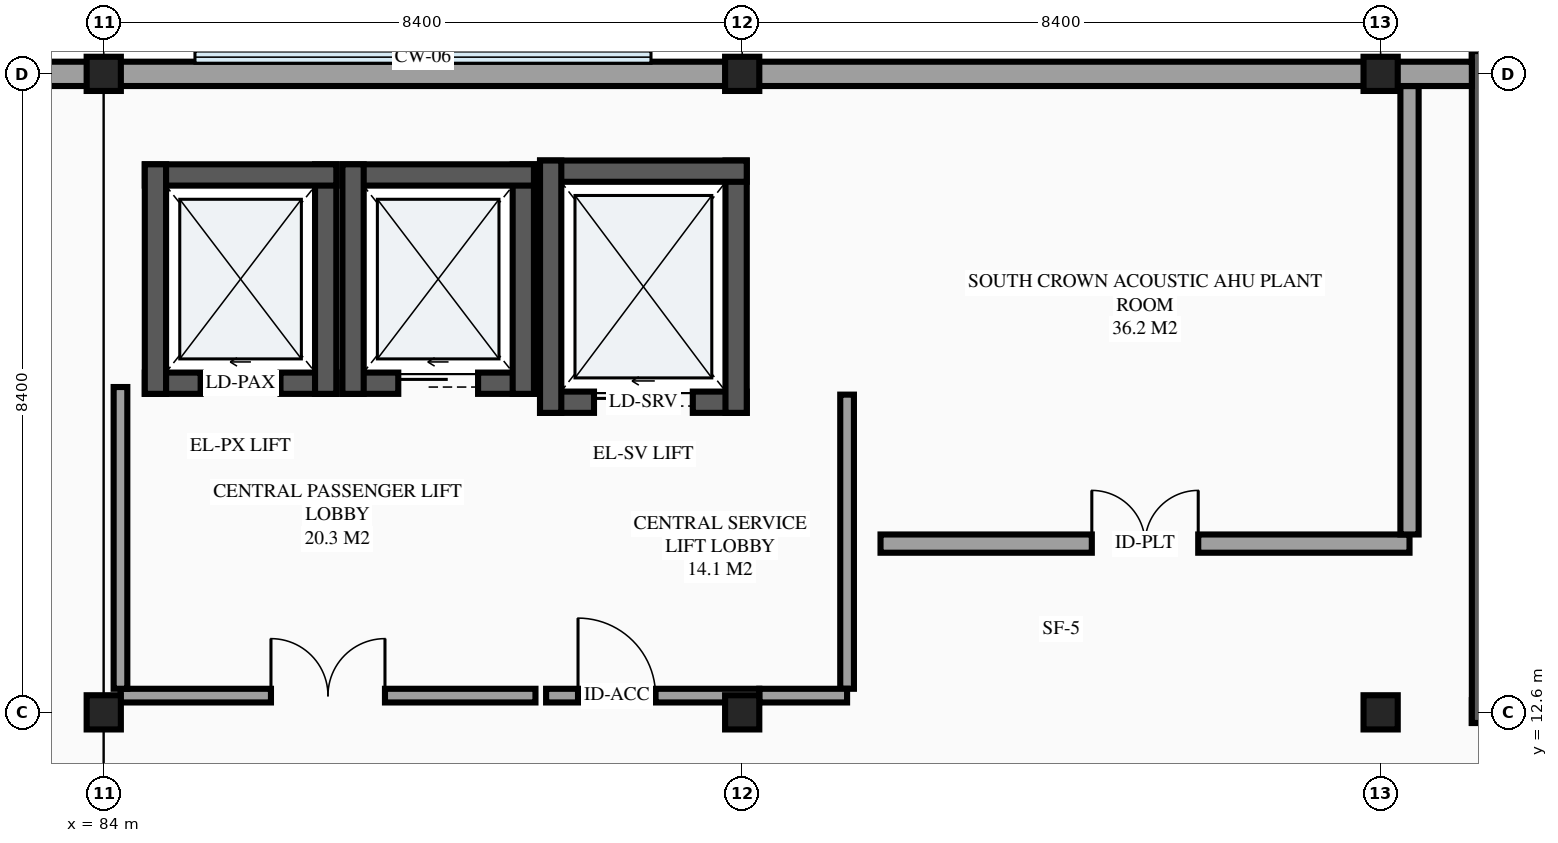
"""IFC4 building model, lengths in metres.
Left out: names, types, materials, properties, quantities, classifications, styles, units other than length and angle.
Written with IfcOpenShell. Run it as: python <this file> out.ifc"""

import sys

from ifc_helpers import new_model, si_unit, direction, frame, frame_2d, origin, origin_2d, place, context, subcontext, project, spatial, rectangle, extrude, element, fill, save


model = new_model("IFC4")
c1 = context("Model", 3, precision=1e-05, world=origin(), true_north=direction((0.0, 1.0)))
c2 = subcontext(c1, "Body", "Model", "MODEL_VIEW")
j1 = project(units=[si_unit("LENGTHUNIT", "METRE"), si_unit("PLANEANGLEUNIT", "RADIAN")], contexts=[c1])
p1 = place(None, origin())
s1 = spatial("IfcSite", under=j1, at=p1, CompositionType="ELEMENT")
p2 = place(p1, origin())
s2 = spatial("IfcBuilding", under=s1, at=p2, CompositionType="ELEMENT")
p3 = place(p2, frame((0.0, 0.0, 43.5)))
s3 = spatial("IfcBuildingStorey", under=s2, at=p3, CompositionType="ELEMENT", Elevation=43.5)
for number, where, z_axis, x_axis in (
    (1, (84.0, 12.6, 0.0), (0.0, 0.0, 1.0), (1.0, 0.0, 0.0)),
    (2, (84.0, 21.0, 0.0), (0.0, 0.0, 1.0), (1.0, 0.0, 0.0)),
    (3, (92.4, 12.6, 0.0), (0.0, 0.0, 1.0), (1.0, 0.0, 0.0)),
    (4, (92.4, 21.0, 0.0), (0.0, 0.0, 1.0), (1.0, 0.0, 0.0)),
    (5, (100.8, 12.6, 0.0), (0.0, 0.0, 1.0), (1.0, 0.0, 0.0)),
    (6, (100.8, 21.0, 0.0), (0.0, 0.0, 1.0), (1.0, 0.0, 0.0)),
):
    element("IfcColumn", number, at=place(p3, frame(where, z_axis=z_axis, x_axis=x_axis)), inside=s3, PredefinedType="COLUMN", context=c2, shape_type="SweptSolid", body=[
        extrude(rectangle(XDim=0.45, YDim=0.45, at=origin_2d()), origin(), (0.0, 0.0, 1.0), 3.6),
    ])
p4 = place(p3, frame((100.8, 21.0, 0.0), z_axis=(0.0, 0.0, 1.0), x_axis=(-1.0, 0.0, 0.0)))
e7 = element("IfcWall", 7, at=p4, inside=s3, PredefinedType="STANDARD", context=c2, shape_type="SweptSolid", body=[
    extrude(rectangle(XDim=8.4, YDim=0.32, at=frame_2d((4.2, 0.0))), origin(), (0.0, 0.0, 1.0), 2.51),
])
p5 = place(p3, frame((84.54, 16.93, 0.0), z_axis=(0.0, 0.0, 1.0), x_axis=(1.0, 0.0, 0.0)))
e8 = element("IfcWall", 8, at=p5, inside=s3, PredefinedType="SHEAR", context=c2, shape_type="SweptSolid", body=[
    extrude(rectangle(XDim=2.52, YDim=0.28, at=frame_2d((1.26, 0.0))), origin(), (0.0, 0.0, 1.0), 3.6),
])
p6 = place(p5, frame((0.735, 0.0, 0.0)))
e9 = element("IfcOpeningElement", 9, at=p6, cuts=e8, PredefinedType="OPENING", context=c2, shape_type="SweptSolid", body=[
    extrude(rectangle(XDim=1.05, YDim=2.2, at=frame_2d((0.525, 1.1))), frame((0.0, 0.15, 0.0), z_axis=(0.0, -1.0, 0.0), x_axis=(1.0, 0.0, 0.0)), (0.0, 0.0, 1.0), 0.3),
])
p7 = place(p3, frame((86.92, 16.79, 0.0), z_axis=(0.0, 0.0, 1.0), x_axis=(0.0, 1.0, 0.0)))
e10 = element("IfcWall", 10, at=p7, inside=s3, PredefinedType="SHEAR", context=c2, shape_type="SweptSolid", body=[
    extrude(rectangle(XDim=3.02, YDim=0.28, at=frame_2d((1.51, 0.0))), origin(), (0.0, 0.0, 1.0), 3.6),
])
p8 = place(p3, frame((87.06, 19.67, 0.0), z_axis=(0.0, 0.0, 1.0), x_axis=(-1.0, 0.0, 0.0)))
e11 = element("IfcWall", 11, at=p8, inside=s3, PredefinedType="SHEAR", context=c2, shape_type="SweptSolid", body=[
    extrude(rectangle(XDim=2.52, YDim=0.28, at=frame_2d((1.26, 0.0))), origin(), (0.0, 0.0, 1.0), 3.6),
])
p9 = place(p3, frame((84.68, 19.81, 0.0), z_axis=(0.0, 0.0, 1.0), x_axis=(0.0, -1.0, 0.0)))
e12 = element("IfcWall", 12, at=p9, inside=s3, PredefinedType="SHEAR", context=c2, shape_type="SweptSolid", body=[
    extrude(rectangle(XDim=3.02, YDim=0.28, at=frame_2d((1.51, 0.0))), origin(), (0.0, 0.0, 1.0), 3.6),
])
p10 = place(p3, frame((87.14, 16.93, 0.0), z_axis=(0.0, 0.0, 1.0), x_axis=(1.0, 0.0, 0.0)))
e13 = element("IfcWall", 13, at=p10, inside=s3, PredefinedType="SHEAR", context=c2, shape_type="SweptSolid", body=[
    extrude(rectangle(XDim=2.52, YDim=0.28, at=frame_2d((1.26, 0.0))), origin(), (0.0, 0.0, 1.0), 3.6),
])
p11 = place(p10, frame((0.735, 0.0, 0.0)))
e14 = element("IfcOpeningElement", 14, at=p11, cuts=e13, PredefinedType="OPENING", context=c2, shape_type="SweptSolid", body=[
    extrude(rectangle(XDim=1.05, YDim=2.2, at=frame_2d((0.525, 1.1))), frame((0.0, 0.15, 0.0), z_axis=(0.0, -1.0, 0.0), x_axis=(1.0, 0.0, 0.0)), (0.0, 0.0, 1.0), 0.3),
])
p12 = place(p3, frame((89.52, 16.79, 0.0), z_axis=(0.0, 0.0, 1.0), x_axis=(0.0, 1.0, 0.0)))
e15 = element("IfcWall", 15, at=p12, inside=s3, PredefinedType="SHEAR", context=c2, shape_type="SweptSolid", body=[
    extrude(rectangle(XDim=3.02, YDim=0.28, at=frame_2d((1.51, 0.0))), origin(), (0.0, 0.0, 1.0), 3.6),
])
p13 = place(p3, frame((89.66, 19.67, 0.0), z_axis=(0.0, 0.0, 1.0), x_axis=(-1.0, 0.0, 0.0)))
e16 = element("IfcWall", 16, at=p13, inside=s3, PredefinedType="SHEAR", context=c2, shape_type="SweptSolid", body=[
    extrude(rectangle(XDim=2.52, YDim=0.28, at=frame_2d((1.26, 0.0))), origin(), (0.0, 0.0, 1.0), 3.6),
])
p14 = place(p3, frame((87.28, 19.81, 0.0), z_axis=(0.0, 0.0, 1.0), x_axis=(0.0, -1.0, 0.0)))
e17 = element("IfcWall", 17, at=p14, inside=s3, PredefinedType="SHEAR", context=c2, shape_type="SweptSolid", body=[
    extrude(rectangle(XDim=3.02, YDim=0.28, at=frame_2d((1.51, 0.0))), origin(), (0.0, 0.0, 1.0), 3.6),
])
p15 = place(p3, frame((89.74, 16.68, 0.0), z_axis=(0.0, 0.0, 1.0), x_axis=(1.0, 0.0, 0.0)))
e18 = element("IfcWall", 18, at=p15, inside=s3, PredefinedType="SHEAR", context=c2, shape_type="SweptSolid", body=[
    extrude(rectangle(XDim=2.72, YDim=0.28, at=frame_2d((1.36, 0.0))), origin(), (0.0, 0.0, 1.0), 3.6),
])
p16 = place(p15, frame((0.71, 0.0, 0.0)))
e19 = element("IfcOpeningElement", 19, at=p16, cuts=e18, PredefinedType="OPENING", context=c2, shape_type="SweptSolid", body=[
    extrude(rectangle(XDim=1.3, YDim=2.25, at=frame_2d((0.65, 1.125))), frame((0.0, 0.15, 0.0), z_axis=(0.0, -1.0, 0.0), x_axis=(1.0, 0.0, 0.0)), (0.0, 0.0, 1.0), 0.3),
])
p17 = place(p3, frame((92.32, 16.54, 0.0), z_axis=(0.0, 0.0, 1.0), x_axis=(0.0, 1.0, 0.0)))
e20 = element("IfcWall", 20, at=p17, inside=s3, PredefinedType="SHEAR", context=c2, shape_type="SweptSolid", body=[
    extrude(rectangle(XDim=3.32, YDim=0.28, at=frame_2d((1.66, 0.0))), origin(), (0.0, 0.0, 1.0), 3.6),
])
p18 = place(p3, frame((92.46, 19.72, 0.0), z_axis=(0.0, 0.0, 1.0), x_axis=(-1.0, 0.0, 0.0)))
e21 = element("IfcWall", 21, at=p18, inside=s3, PredefinedType="SHEAR", context=c2, shape_type="SweptSolid", body=[
    extrude(rectangle(XDim=2.72, YDim=0.28, at=frame_2d((1.36, 0.0))), origin(), (0.0, 0.0, 1.0), 3.6),
])
p19 = place(p3, frame((89.88, 19.86, 0.0), z_axis=(0.0, 0.0, 1.0), x_axis=(0.0, -1.0, 0.0)))
e22 = element("IfcWall", 22, at=p19, inside=s3, PredefinedType="SHEAR", context=c2, shape_type="SweptSolid", body=[
    extrude(rectangle(XDim=3.32, YDim=0.28, at=frame_2d((1.66, 0.0))), origin(), (0.0, 0.0, 1.0), 3.6),
])
p20 = place(p3, frame((102.0, 12.61, 0.0), z_axis=(0.0, 0.0, 1.0), x_axis=(1.0, 0.0, 0.0)))
e23 = element("IfcWall", 23, at=p20, inside=s3, PredefinedType="SHEAR", context=c2, shape_type="SweptSolid", body=[
    extrude(rectangle(XDim=5.2, YDim=0.3, at=frame_2d((2.6, 0.0))), origin(), (0.0, 0.0, 1.0), 3.6),
])
p21 = place(p20, frame((2.025, 0.0, 0.0)))
e24 = element("IfcOpeningElement", 24, at=p21, cuts=e23, PredefinedType="OPENING", context=c2, shape_type="SweptSolid", body=[
    extrude(rectangle(XDim=1.15, YDim=2.15, at=frame_2d((0.575, 1.075))), frame((0.0, 0.16, 0.0), z_axis=(0.0, -1.0, 0.0), x_axis=(1.0, 0.0, 0.0)), (0.0, 0.0, 1.0), 0.32),
])
p22 = place(p3, frame((107.2, 21.15, 0.0), z_axis=(0.0, 0.0, 1.0), x_axis=(-1.0, 0.0, 0.0)))
e25 = element("IfcWall", 25, at=p22, inside=s3, PredefinedType="SHEAR", context=c2, shape_type="SweptSolid", body=[
    extrude(rectangle(XDim=5.2, YDim=0.3, at=frame_2d((2.6, 0.0))), origin(), (0.0, 0.0, 1.0), 3.6),
])
p23 = place(p3, frame((102.15, 21.3, 0.0), z_axis=(0.0, 0.0, 1.0), x_axis=(0.0, -1.0, 0.0)))
e26 = element("IfcWall", 26, at=p23, inside=s3, PredefinedType="SHEAR", context=c2, shape_type="SweptSolid", body=[
    extrude(rectangle(XDim=8.84, YDim=0.3, at=frame_2d((4.42, 0.0))), origin(), (0.0, 0.0, 1.0), 3.6),
])
p24 = place(p3, frame((84.22, 12.82, 0.0), z_axis=(0.0, 0.0, 1.0), x_axis=(1.0, 0.0, 0.0)))
e27 = element("IfcWall", 27, at=p24, inside=s3, PredefinedType="PARTITIONING", context=c2, shape_type="SweptSolid", body=[
    extrude(rectangle(XDim=5.46, YDim=0.18, at=frame_2d((2.73, 0.0))), origin(), (0.0, 0.0, 1.0), 3.355),
])
p25 = place(p24, frame((1.98, 0.0, 0.0)))
e28 = element("IfcOpeningElement", 28, at=p25, cuts=e27, PredefinedType="OPENING", context=c2, shape_type="SweptSolid", body=[
    extrude(rectangle(XDim=1.5, YDim=2.15, at=frame_2d((0.75, 1.075))), frame((0.0, 0.1, 0.0), z_axis=(0.0, -1.0, 0.0), x_axis=(1.0, 0.0, 0.0)), (0.0, 0.0, 1.0), 0.2),
])
p26 = place(p3, frame((84.22, 12.91, 0.0), z_axis=(0.0, 0.0, 1.0), x_axis=(0.0, 1.0, 0.0)))
e29 = element("IfcWall", 29, at=p26, inside=s3, PredefinedType="PARTITIONING", context=c2, shape_type="SweptSolid", body=[
    extrude(rectangle(XDim=3.97, YDim=0.18, at=frame_2d((1.985, 0.0))), origin(), (0.0, 0.0, 1.0), 2.61),
])
p27 = place(p3, frame((89.82, 12.82, 0.0), z_axis=(0.0, 0.0, 1.0), x_axis=(1.0, 0.0, 0.0)))
e30 = element("IfcWall", 30, at=p27, inside=s3, PredefinedType="PARTITIONING", context=c2, shape_type="SweptSolid", body=[
    extrude(rectangle(XDim=2.805, YDim=0.18, at=frame_2d((1.402, 0.0))), origin(), (0.0, 0.0, 1.0), 3.355),
])
p28 = place(p27, frame((0.42, 0.0, 0.0)))
e31 = element("IfcOpeningElement", 31, at=p28, cuts=e30, PredefinedType="OPENING", context=c2, shape_type="SweptSolid", body=[
    extrude(rectangle(XDim=1.02, YDim=2.15, at=frame_2d((0.51, 1.075))), frame((0.0, 0.1, 0.0), z_axis=(0.0, -1.0, 0.0), x_axis=(1.0, 0.0, 0.0)), (0.0, 0.0, 1.0), 0.2),
])
p29 = place(p3, frame((93.78, 12.91, 0.0), z_axis=(0.0, 0.0, 1.0), x_axis=(0.0, 1.0, 0.0)))
e32 = element("IfcWall", 32, at=p29, inside=s3, PredefinedType="PARTITIONING", context=c2, shape_type="SweptSolid", body=[
    extrude(rectangle(XDim=3.87, YDim=0.18, at=frame_2d((1.935, 0.0))), origin(), (0.0, 0.0, 1.0), 3.355),
])
p30 = place(p3, frame((94.22, 14.82, 0.0), z_axis=(0.0, 0.0, 1.0), x_axis=(1.0, 0.0, 0.0)))
e33 = element("IfcWall", 33, at=p30, inside=s3, PredefinedType="PARTITIONING", context=c2, shape_type="SweptSolid", body=[
    extrude(rectangle(XDim=6.96, YDim=0.24, at=frame_2d((3.48, 0.0))), origin(), (0.0, 0.0, 1.0), 3.355),
])
p31 = place(p30, frame((2.78, 0.0, 0.0)))
e34 = element("IfcOpeningElement", 34, at=p31, cuts=e33, PredefinedType="OPENING", context=c2, shape_type="SweptSolid", body=[
    extrude(rectangle(XDim=1.4, YDim=2.2, at=frame_2d((0.7, 1.1))), frame((0.0, 0.13, 0.0), z_axis=(0.0, -1.0, 0.0), x_axis=(1.0, 0.0, 0.0)), (0.0, 0.0, 1.0), 0.26),
])
p32 = place(p3, frame((101.18, 14.94, 0.0), z_axis=(0.0, 0.0, 1.0), x_axis=(0.0, 1.0, 0.0)))
e35 = element("IfcWall", 35, at=p32, inside=s3, PredefinedType="PARTITIONING", context=c2, shape_type="SweptSolid", body=[
    extrude(rectangle(XDim=5.9, YDim=0.24, at=frame_2d((2.95, 0.0))), origin(), (0.0, 0.0, 1.0), 3.355),
])
p33 = place(p3, frame((102.0, 21.0, 0.0), z_axis=(0.0, 0.0, 1.0), x_axis=(-1.0, 0.0, 0.0)))
e36 = element("IfcWall", 36, at=p33, inside=s3, PredefinedType="STANDARD", context=c2, shape_type="SweptSolid", body=[
    extrude(rectangle(XDim=1.2, YDim=0.32, at=frame_2d((0.6, 0.0))), origin(), (0.0, 0.0, 1.0), 3.113),
])
p34 = place(p3, frame((92.4, 21.0, 0.0), z_axis=(0.0, 0.0, 1.0), x_axis=(-1.0, 0.0, 0.0)))
e37 = element("IfcWall", 37, at=p34, inside=s3, PredefinedType="STANDARD", context=c2, shape_type="SweptSolid", body=[
    extrude(rectangle(XDim=8.4, YDim=0.32, at=frame_2d((4.2, 0.0))), origin(), (0.0, 0.0, 1.0), 2.41),
])
p35 = place(p3, frame((84.0, 21.0, 0.0), z_axis=(0.0, 0.0, 1.0), x_axis=(-1.0, 0.0, 0.0)))
e38 = element("IfcWall", 38, at=p35, inside=s3, PredefinedType="STANDARD", context=c2, shape_type="SweptSolid", body=[
    extrude(rectangle(XDim=2.0, YDim=0.32, at=frame_2d((1.0, 0.0))), origin(), (0.0, 0.0, 1.0), 3.106),
])
p36 = place(p3, frame((92.625, 12.82, 0.0), z_axis=(0.0, 0.0, 1.0), x_axis=(1.0, 0.0, 0.0)))
e39 = element("IfcWall", 39, at=p36, inside=s3, PredefinedType="PARTITIONING", context=c2, shape_type="SweptSolid", body=[
    extrude(rectangle(XDim=1.155, YDim=0.18, at=frame_2d((0.578, 0.0))), origin(), (0.0, 0.0, 1.0), 2.41),
])
p37 = place(p6, origin())
e40 = element("IfcDoor", 40, at=p37, inside=s3, OperationType="SLIDING_TO_LEFT", PredefinedType="DOOR", context=c2, shape_type="SweptSolid", body=[
    extrude(rectangle(XDim=1.05, YDim=2.2, at=frame_2d((0.525, 1.1))), frame((0.0, 0.025, 0.0), z_axis=(0.0, -1.0, 0.0), x_axis=(1.0, 0.0, 0.0)), (0.0, 0.0, 1.0), 0.05),
])
fill(e9, e40)
p38 = place(p11, origin())
e41 = element("IfcDoor", 41, at=p38, inside=s3, OperationType="SLIDING_TO_LEFT", PredefinedType="DOOR", context=c2, shape_type="SweptSolid", body=[
    extrude(rectangle(XDim=1.05, YDim=2.2, at=frame_2d((0.525, 1.1))), frame((0.0, 0.025, 0.0), z_axis=(0.0, -1.0, 0.0), x_axis=(1.0, 0.0, 0.0)), (0.0, 0.0, 1.0), 0.05),
])
fill(e14, e41)
p39 = place(p16, origin())
e42 = element("IfcDoor", 42, at=p39, inside=s3, OperationType="SLIDING_TO_LEFT", PredefinedType="DOOR", context=c2, shape_type="SweptSolid", body=[
    extrude(rectangle(XDim=1.3, YDim=2.25, at=frame_2d((0.65, 1.125))), frame((0.0, 0.025, 0.0), z_axis=(0.0, -1.0, 0.0), x_axis=(1.0, 0.0, 0.0)), (0.0, 0.0, 1.0), 0.05),
])
fill(e19, e42)
p40 = place(p25, origin())
e43 = element("IfcDoor", 43, at=p40, inside=s3, OperationType="DOUBLE_DOOR_SINGLE_SWING", PredefinedType="DOOR", context=c2, shape_type="SweptSolid", body=[
    extrude(rectangle(XDim=1.5, YDim=2.15, at=frame_2d((0.75, 1.075))), frame((0.0, 0.025, 0.0), z_axis=(0.0, -1.0, 0.0), x_axis=(1.0, 0.0, 0.0)), (0.0, 0.0, 1.0), 0.05),
])
fill(e28, e43)
p41 = place(p28, origin())
e44 = element("IfcDoor", 44, at=p41, inside=s3, OperationType="SINGLE_SWING_LEFT", PredefinedType="DOOR", context=c2, shape_type="SweptSolid", body=[
    extrude(rectangle(XDim=1.02, YDim=2.15, at=frame_2d((0.51, 1.075))), frame((0.0, 0.025, 0.0), z_axis=(0.0, -1.0, 0.0), x_axis=(1.0, 0.0, 0.0)), (0.0, 0.0, 1.0), 0.05),
])
fill(e31, e44)
p42 = place(p31, origin())
e45 = element("IfcDoor", 45, at=p42, inside=s3, OperationType="DOUBLE_DOOR_SINGLE_SWING", PredefinedType="DOOR", context=c2, shape_type="SweptSolid", body=[
    extrude(rectangle(XDim=1.4, YDim=2.2, at=frame_2d((0.7, 1.1))), frame((0.0, 0.025, 0.0), z_axis=(0.0, -1.0, 0.0), x_axis=(1.0, 0.0, 0.0)), (0.0, 0.0, 1.0), 0.05),
])
fill(e34, e45)
save(model, sys.argv[1])
